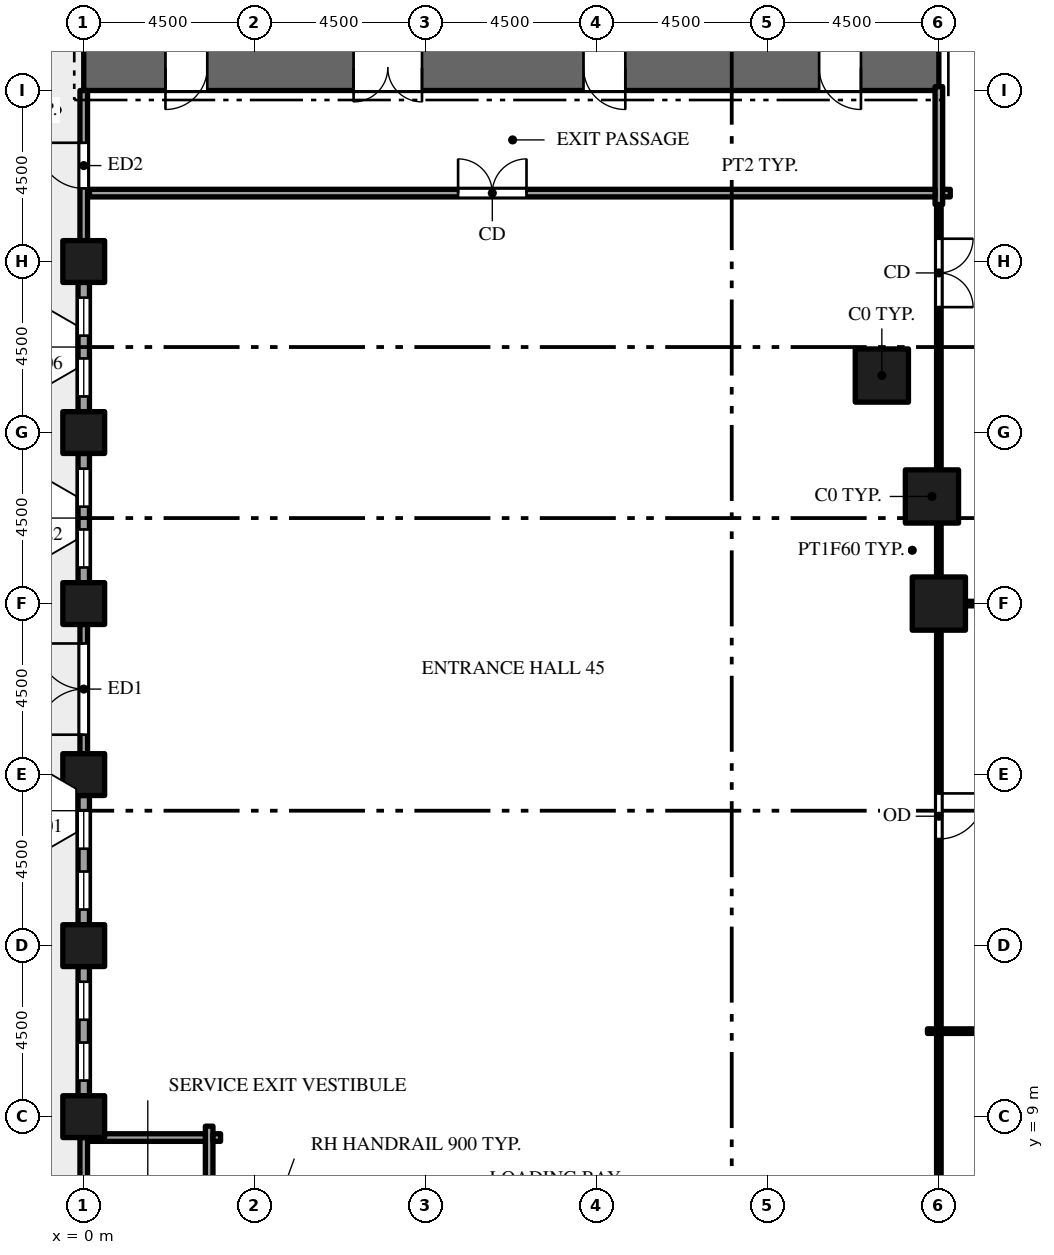
"""IFC4 building model, lengths in metres.
Left out: names, types, materials, properties, quantities, classifications, styles, units other than length and angle.
Written with IfcOpenShell. Run it as: python <this file> out.ifc"""

import sys

from ifc_helpers import new_model, si_unit, direction, frame, frame_2d, origin, origin_2d, place, context, subcontext, project, spatial, rectangle, hollow_rectangle, extrude, element, fill, save


model = new_model("IFC4")
c1 = context("Model", 3, precision=1e-05, world=origin(), true_north=direction((0.0, 1.0)))
c2 = subcontext(c1, "Body", "Model", "MODEL_VIEW")
j1 = project(units=[si_unit("LENGTHUNIT", "METRE"), si_unit("PLANEANGLEUNIT", "RADIAN")], contexts=[c1])
p1 = place(None, origin())
s1 = spatial("IfcSite", under=j1, at=p1, CompositionType="ELEMENT")
p2 = place(p1, origin())
s2 = spatial("IfcBuilding", under=s1, at=p2, CompositionType="ELEMENT")
p3 = place(p2, origin())
s3 = spatial("IfcBuildingStorey", under=s2, at=p3, CompositionType="ELEMENT", Elevation=0.0)
p4 = place(p3, frame((0.0, 36.6, -0.3), z_axis=(0.0, 0.0, 1.0), x_axis=(1.0, 0.0, 0.0)))
e1 = element("IfcWall", 1, at=p4, inside=s3, PredefinedType="SHEAR", context=c2, shape_type="SweptSolid", body=[
    extrude(rectangle(XDim=22.5, YDim=1.2, at=frame_2d((11.25, 0.0))), origin(), (0.0, 0.0, 1.0), 8.15),
])
p5 = place(p4, frame((7.1, 0.0, 0.3)))
e2 = element("IfcOpeningElement", 2, at=p5, cuts=e1, PredefinedType="OPENING", context=c2, shape_type="SweptSolid", body=[
    extrude(rectangle(XDim=1.8, YDim=2.1, at=frame_2d((0.9, 1.05))), frame((0.0, 0.61, 0.0), z_axis=(0.0, -1.0, 0.0), x_axis=(1.0, 0.0, 0.0)), (0.0, 0.0, 1.0), 1.22),
])
p6 = place(p4, frame((13.15, 0.0, 0.3)))
e3 = element("IfcOpeningElement", 3, at=p6, cuts=e1, PredefinedType="OPENING", context=c2, shape_type="SweptSolid", body=[
    extrude(rectangle(XDim=1.1, YDim=2.1, at=frame_2d((0.55, 1.05))), frame((0.0, 0.61, 0.0), z_axis=(0.0, -1.0, 0.0), x_axis=(1.0, 0.0, 0.0)), (0.0, 0.0, 1.0), 1.22),
])
p7 = place(p4, frame((2.15, 0.0, 0.3)))
e4 = element("IfcOpeningElement", 4, at=p7, cuts=e1, PredefinedType="OPENING", context=c2, shape_type="SweptSolid", body=[
    extrude(rectangle(XDim=1.1, YDim=2.1, at=frame_2d((0.55, 1.05))), frame((0.0, 0.61, 0.0), z_axis=(0.0, -1.0, 0.0), x_axis=(1.0, 0.0, 0.0)), (0.0, 0.0, 1.0), 1.22),
])
p8 = place(p4, frame((19.35, 0.0, 0.3)))
e5 = element("IfcOpeningElement", 5, at=p8, cuts=e1, PredefinedType="OPENING", context=c2, shape_type="SweptSolid", body=[
    extrude(rectangle(XDim=1.1, YDim=2.1, at=frame_2d((0.55, 1.05))), frame((0.0, 0.61, 0.0), z_axis=(0.0, -1.0, 0.0), x_axis=(1.0, 0.0, 0.0)), (0.0, 0.0, 1.0), 1.22),
])
for number, where, z_axis, x_axis in (
    (6, (0.0, 9.0, -0.3), (0.0, 0.0, 1.0), (1.0, 0.0, 0.0)),
    (7, (0.0, 13.5, -0.3), (0.0, 0.0, 1.0), (1.0, 0.0, 0.0)),
    (8, (0.0, 18.0, -0.3), (0.0, 0.0, 1.0), (1.0, 0.0, 0.0)),
    (9, (0.0, 22.5, -0.3), (0.0, 0.0, 1.0), (1.0, 0.0, 0.0)),
    (10, (0.0, 27.0, -0.3), (0.0, 0.0, 1.0), (1.0, 0.0, 0.0)),
    (11, (0.0, 31.5, -0.3), (0.0, 0.0, 1.0), (1.0, 0.0, 0.0)),
):
    element("IfcColumn", number, at=place(p3, frame(where, z_axis=z_axis, x_axis=x_axis)), inside=s3, PredefinedType="COLUMN", context=c2, shape_type="SweptSolid", body=[
        extrude(hollow_rectangle(XDim=1.1, YDim=1.1, WallThickness=0.06, at=origin_2d()), origin(), (0.0, 0.0, 1.0), 8.05),
    ])
for number, where, z_axis, x_axis in (
    (12, (21.0, 28.5, -0.3), (0.0, 0.0, 1.0), (1.0, 0.0, 0.0)),
    (13, (22.318, 25.318, -0.3), (0.0, 0.0, 1.0), (1.0, 0.0, 0.0)),
    (14, (22.5, 22.5, -0.3), (0.0, 0.0, 1.0), (1.0, 0.0, 0.0)),
):
    element("IfcColumn", number, at=place(p3, frame(where, z_axis=z_axis, x_axis=x_axis)), inside=s3, PredefinedType="COLUMN", context=c2, shape_type="SweptSolid", body=[
        extrude(hollow_rectangle(XDim=1.4, YDim=1.4, WallThickness=0.08, at=origin_2d()), origin(), (0.0, 0.0, 1.0), 8.05),
    ])
p9 = place(p3, frame((0.0, 32.05, 0.0), z_axis=(0.0, 0.0, 1.0), x_axis=(0.0, 1.0, 0.0)))
e15 = element("IfcWall", 15, at=p9, inside=s3, PredefinedType="STANDARD", context=c2, shape_type="SweptSolid", body=[
    extrude(rectangle(XDim=3.949, YDim=0.2, at=frame_2d((1.975, 0.0))), origin(), (0.0, 0.0, 1.0), 7.036),
])
p10 = place(p9, frame((1.375, 0.0, 0.0)))
e16 = element("IfcOpeningElement", 16, at=p10, cuts=e15, PredefinedType="OPENING", context=c2, shape_type="SweptSolid", body=[
    extrude(rectangle(XDim=1.2, YDim=2.4, at=frame_2d((0.6, 1.2))), frame((0.0, 0.11, 0.0), z_axis=(0.0, -1.0, 0.0), x_axis=(1.0, 0.0, 0.0)), (0.0, 0.0, 1.0), 0.22),
])
p11 = place(p3, frame((0.0, 30.95, 0.0), z_axis=(0.0, 0.0, 1.0), x_axis=(0.0, -1.0, 0.0)))
e17 = element("IfcWall", 17, at=p11, inside=s3, PredefinedType="STANDARD", context=c2, shape_type="SweptSolid", body=[
    extrude(rectangle(XDim=3.4, YDim=0.3, at=frame_2d((1.7, 0.0))), origin(), (0.0, 0.0, 1.0), 7.036),
])
p12 = place(p11, frame((0.4, 0.0, 0.9)))
e18 = element("IfcOpeningElement", 18, at=p12, cuts=e17, PredefinedType="OPENING", context=c2, shape_type="SweptSolid", body=[
    extrude(rectangle(XDim=1.0, YDim=3.5, at=frame_2d((0.5, 1.75))), frame((0.0, 0.16, 0.0), z_axis=(0.0, -1.0, 0.0), x_axis=(1.0, 0.0, 0.0)), (0.0, 0.0, 1.0), 0.32),
])
p13 = place(p11, frame((2.0, 0.0, 0.9)))
e19 = element("IfcOpeningElement", 19, at=p13, cuts=e17, PredefinedType="OPENING", context=c2, shape_type="SweptSolid", body=[
    extrude(rectangle(XDim=1.0, YDim=3.5, at=frame_2d((0.5, 1.75))), frame((0.0, 0.16, 0.0), z_axis=(0.0, -1.0, 0.0), x_axis=(1.0, 0.0, 0.0)), (0.0, 0.0, 1.0), 0.32),
])
p14 = place(p3, frame((0.0, 26.45, 0.0), z_axis=(0.0, 0.0, 1.0), x_axis=(0.0, -1.0, 0.0)))
e20 = element("IfcWall", 20, at=p14, inside=s3, PredefinedType="STANDARD", context=c2, shape_type="SweptSolid", body=[
    extrude(rectangle(XDim=3.4, YDim=0.3, at=frame_2d((1.7, 0.0))), origin(), (0.0, 0.0, 1.0), 7.036),
])
p15 = place(p14, frame((0.4, 0.0, 0.9)))
e21 = element("IfcOpeningElement", 21, at=p15, cuts=e20, PredefinedType="OPENING", context=c2, shape_type="SweptSolid", body=[
    extrude(rectangle(XDim=1.0, YDim=3.5, at=frame_2d((0.5, 1.75))), frame((0.0, 0.16, 0.0), z_axis=(0.0, -1.0, 0.0), x_axis=(1.0, 0.0, 0.0)), (0.0, 0.0, 1.0), 0.32),
])
p16 = place(p14, frame((2.0, 0.0, 0.9)))
e22 = element("IfcOpeningElement", 22, at=p16, cuts=e20, PredefinedType="OPENING", context=c2, shape_type="SweptSolid", body=[
    extrude(rectangle(XDim=1.0, YDim=3.5, at=frame_2d((0.5, 1.75))), frame((0.0, 0.16, 0.0), z_axis=(0.0, -1.0, 0.0), x_axis=(1.0, 0.0, 0.0)), (0.0, 0.0, 1.0), 0.32),
])
p17 = place(p3, frame((0.0, 18.55, 0.0), z_axis=(0.0, 0.0, 1.0), x_axis=(0.0, 1.0, 0.0)))
e23 = element("IfcWall", 23, at=p17, inside=s3, PredefinedType="STANDARD", context=c2, shape_type="SweptSolid", body=[
    extrude(rectangle(XDim=3.4, YDim=0.2, at=frame_2d((1.7, 0.0))), origin(), (0.0, 0.0, 1.0), 7.036),
])
p18 = place(p17, frame((0.5, 0.0, 0.0)))
e24 = element("IfcOpeningElement", 24, at=p18, cuts=e23, PredefinedType="OPENING", context=c2, shape_type="SweptSolid", body=[
    extrude(rectangle(XDim=2.4, YDim=3.0, at=frame_2d((1.2, 1.5))), frame((0.0, 0.11, 0.0), z_axis=(0.0, -1.0, 0.0), x_axis=(1.0, 0.0, 0.0)), (0.0, 0.0, 1.0), 0.22),
])
p19 = place(p3, frame((0.0, 17.45, 0.0), z_axis=(0.0, 0.0, 1.0), x_axis=(0.0, -1.0, 0.0)))
e25 = element("IfcWall", 25, at=p19, inside=s3, PredefinedType="STANDARD", context=c2, shape_type="SweptSolid", body=[
    extrude(rectangle(XDim=3.4, YDim=0.3, at=frame_2d((1.7, 0.0))), origin(), (0.0, 0.0, 1.0), 7.036),
])
p20 = place(p19, frame((0.4, 0.0, 0.9)))
e26 = element("IfcOpeningElement", 26, at=p20, cuts=e25, PredefinedType="OPENING", context=c2, shape_type="SweptSolid", body=[
    extrude(rectangle(XDim=1.0, YDim=3.5, at=frame_2d((0.5, 1.75))), frame((0.0, 0.16, 0.0), z_axis=(0.0, -1.0, 0.0), x_axis=(1.0, 0.0, 0.0)), (0.0, 0.0, 1.0), 0.32),
])
p21 = place(p19, frame((2.0, 0.0, 0.9)))
e27 = element("IfcOpeningElement", 27, at=p21, cuts=e25, PredefinedType="OPENING", context=c2, shape_type="SweptSolid", body=[
    extrude(rectangle(XDim=1.0, YDim=3.5, at=frame_2d((0.5, 1.75))), frame((0.0, 0.16, 0.0), z_axis=(0.0, -1.0, 0.0), x_axis=(1.0, 0.0, 0.0)), (0.0, 0.0, 1.0), 0.32),
])
p22 = place(p3, frame((0.0, 12.95, 0.0), z_axis=(0.0, 0.0, 1.0), x_axis=(0.0, -1.0, 0.0)))
e28 = element("IfcWall", 28, at=p22, inside=s3, PredefinedType="STANDARD", context=c2, shape_type="SweptSolid", body=[
    extrude(rectangle(XDim=3.4, YDim=0.3, at=frame_2d((1.7, 0.0))), origin(), (0.0, 0.0, 1.0), 7.036),
])
p23 = place(p22, frame((0.4, 0.0, 0.9)))
e29 = element("IfcOpeningElement", 29, at=p23, cuts=e28, PredefinedType="OPENING", context=c2, shape_type="SweptSolid", body=[
    extrude(rectangle(XDim=1.0, YDim=3.5, at=frame_2d((0.5, 1.75))), frame((0.0, 0.16, 0.0), z_axis=(0.0, -1.0, 0.0), x_axis=(1.0, 0.0, 0.0)), (0.0, 0.0, 1.0), 0.32),
])
p24 = place(p22, frame((2.0, 0.0, 0.9)))
e30 = element("IfcOpeningElement", 30, at=p24, cuts=e28, PredefinedType="OPENING", context=c2, shape_type="SweptSolid", body=[
    extrude(rectangle(XDim=1.0, YDim=3.5, at=frame_2d((0.5, 1.75))), frame((0.0, 0.16, 0.0), z_axis=(0.0, -1.0, 0.0), x_axis=(1.0, 0.0, 0.0)), (0.0, 0.0, 1.0), 0.32),
])
p25 = place(p3, frame((0.0, 5.05, 0.0), z_axis=(0.0, 0.0, 1.0), x_axis=(0.0, 1.0, 0.0)))
e31 = element("IfcWall", 31, at=p25, inside=s3, PredefinedType="STANDARD", context=c2, shape_type="SweptSolid", body=[
    extrude(rectangle(XDim=3.4, YDim=0.2, at=frame_2d((1.7, 0.0))), origin(), (0.0, 0.0, 1.0), 7.036),
])
p26 = place(p25, frame((1.1, 0.0, 0.0)))
e32 = element("IfcOpeningElement", 32, at=p26, cuts=e31, PredefinedType="OPENING", context=c2, shape_type="SweptSolid", body=[
    extrude(rectangle(XDim=1.2, YDim=2.4, at=frame_2d((0.6, 1.2))), frame((0.0, 0.11, 0.0), z_axis=(0.0, -1.0, 0.0), x_axis=(1.0, 0.0, 0.0)), (0.0, 0.0, 1.0), 0.22),
])
p27 = place(p3, frame((3.3, 3.875, 0.0), z_axis=(0.0, 0.0, 1.0), x_axis=(0.0, 1.0, 0.0)))
e33 = element("IfcWall", 33, at=p27, inside=s3, PredefinedType="PARTITIONING", context=c2, shape_type="SweptSolid", body=[
    extrude(rectangle(XDim=4.875, YDim=0.2, at=frame_2d((2.438, 0.0))), origin(), (0.0, 0.0, 1.0), 7.75),
])
p28 = place(p3, frame((22.5, 0.15, 0.0), z_axis=(0.0, 0.0, 1.0), x_axis=(0.0, 1.0, 0.0)))
e34 = element("IfcWall", 34, at=p28, inside=s3, PredefinedType="PARTITIONING", context=c2, shape_type="SweptSolid", body=[
    extrude(rectangle(XDim=32.85, YDim=0.12, at=frame_2d((16.425, 0.0))), origin(), (0.0, 0.0, 1.0), 6.759),
])
p29 = place(p28, frame((5.35, 0.0, 0.0)))
e35 = element("IfcOpeningElement", 35, at=p29, cuts=e34, PredefinedType="OPENING", context=c2, shape_type="SweptSolid", body=[
    extrude(rectangle(XDim=1.2, YDim=2.1, at=frame_2d((0.6, 1.05))), frame((0.0, 0.07, 0.0), z_axis=(0.0, -1.0, 0.0), x_axis=(1.0, 0.0, 0.0)), (0.0, 0.0, 1.0), 0.14),
])
p30 = place(p28, frame((16.155, 0.0, 0.0)))
e36 = element("IfcOpeningElement", 36, at=p30, cuts=e34, PredefinedType="OPENING", context=c2, shape_type="SweptSolid", body=[
    extrude(rectangle(XDim=1.2, YDim=2.1, at=frame_2d((0.6, 1.05))), frame((0.0, 0.07, 0.0), z_axis=(0.0, -1.0, 0.0), x_axis=(1.0, 0.0, 0.0)), (0.0, 0.0, 1.0), 0.14),
])
p31 = place(p28, frame((30.15, 0.0, 0.0)))
e37 = element("IfcOpeningElement", 37, at=p31, cuts=e34, PredefinedType="OPENING", context=c2, shape_type="SweptSolid", body=[
    extrude(rectangle(XDim=1.8, YDim=2.1, at=frame_2d((0.9, 1.05))), frame((0.0, 0.07, 0.0), z_axis=(0.0, -1.0, 0.0), x_axis=(1.0, 0.0, 0.0)), (0.0, 0.0, 1.0), 0.14),
])
p32 = place(p3, frame((22.5, 33.0, 0.0), z_axis=(0.0, 0.0, 1.0), x_axis=(0.0, 1.0, 0.0)))
e38 = element("IfcWall", 38, at=p32, inside=s3, PredefinedType="PARTITIONING", context=c2, shape_type="SweptSolid", body=[
    extrude(rectangle(XDim=3.1, YDim=0.2, at=frame_2d((1.55, 0.0))), origin(), (0.0, 0.0, 1.0), 6.759),
])
p33 = place(p3, frame((0.15, 8.45, 0.0), z_axis=(0.0, 0.0, 1.0), x_axis=(1.0, 0.0, 0.0)))
e39 = element("IfcWall", 39, at=p33, inside=s3, PredefinedType="PARTITIONING", context=c2, shape_type="SweptSolid", body=[
    extrude(rectangle(XDim=3.05, YDim=0.2, at=frame_2d((1.525, 0.0))), origin(), (0.0, 0.0, 1.0), 6.759),
])
p34 = place(p3, frame((3.4, 8.45, 0.0), z_axis=(0.0, 0.0, 1.0), x_axis=(1.0, 0.0, 0.0)))
e40 = element("IfcWall", 40, at=p34, inside=s3, PredefinedType="PARTITIONING", context=c2, shape_type="SweptSolid", body=[
    extrude(rectangle(XDim=0.2, YDim=0.2, at=frame_2d((0.1, 0.0))), origin(), (0.0, 0.0, 1.0), 7.75),
])
p35 = place(p3, frame((22.2, 11.25, 0.0), z_axis=(0.0, 0.0, 1.0), x_axis=(1.0, 0.0, 0.0)))
e41 = element("IfcWall", 41, at=p35, inside=s3, PredefinedType="PARTITIONING", context=c2, shape_type="SweptSolid", body=[
    extrude(rectangle(XDim=0.24, YDim=0.12, at=frame_2d((0.12, 0.0))), origin(), (0.0, 0.0, 1.0), 6.759),
])
p36 = place(p3, frame((22.56, 11.25, 0.0), z_axis=(0.0, 0.0, 1.0), x_axis=(1.0, 0.0, 0.0)))
e42 = element("IfcWall", 42, at=p36, inside=s3, PredefinedType="PARTITIONING", context=c2, shape_type="SweptSolid", body=[
    extrude(rectangle(XDim=8.88, YDim=0.12, at=frame_2d((4.44, 0.0))), origin(), (0.0, 0.0, 1.0), 6.66),
])
p37 = place(p3, frame((22.2, 22.5, 0.0), z_axis=(0.0, 0.0, 1.0), x_axis=(1.0, 0.0, 0.0)))
e43 = element("IfcWall", 43, at=p37, inside=s3, PredefinedType="PARTITIONING", context=c2, shape_type="SweptSolid", body=[
    extrude(rectangle(XDim=0.24, YDim=0.12, at=frame_2d((0.12, 0.0))), origin(), (0.0, 0.0, 1.0), 7.75),
])
p38 = place(p3, frame((22.56, 22.5, 0.0), z_axis=(0.0, 0.0, 1.0), x_axis=(1.0, 0.0, 0.0)))
e44 = element("IfcWall", 44, at=p38, inside=s3, PredefinedType="PARTITIONING", context=c2, shape_type="SweptSolid", body=[
    extrude(rectangle(XDim=4.38, YDim=0.12, at=frame_2d((2.19, 0.0))), origin(), (0.0, 0.0, 1.0), 6.66),
])
p39 = place(p3, frame((0.15, 33.3, 0.0), z_axis=(0.0, 0.0, 1.0), x_axis=(1.0, 0.0, 0.0)))
e45 = element("IfcWall", 45, at=p39, inside=s3, PredefinedType="PARTITIONING", context=c2, shape_type="SweptSolid", body=[
    extrude(rectangle(XDim=22.25, YDim=0.2, at=frame_2d((11.125, 0.0))), origin(), (0.0, 0.0, 1.0), 6.5),
])
p40 = place(p39, frame((9.7, 0.0, 0.0)))
e46 = element("IfcOpeningElement", 46, at=p40, cuts=e45, PredefinedType="OPENING", context=c2, shape_type="SweptSolid", body=[
    extrude(rectangle(XDim=1.8, YDim=2.1, at=frame_2d((0.9, 1.05))), frame((0.0, 0.11, 0.0), z_axis=(0.0, -1.0, 0.0), x_axis=(1.0, 0.0, 0.0)), (0.0, 0.0, 1.0), 0.22),
])
p41 = place(p3, frame((22.6, 33.3, 0.0), z_axis=(0.0, 0.0, 1.0), x_axis=(1.0, 0.0, 0.0)))
e47 = element("IfcWall", 47, at=p41, inside=s3, PredefinedType="PARTITIONING", context=c2, shape_type="SweptSolid", body=[
    extrude(rectangle(XDim=0.2, YDim=0.2, at=frame_2d((0.1, 0.0))), origin(), (0.0, 0.0, 1.0), 6.759),
])
p42 = place(p10, origin())
e48 = element("IfcDoor", 48, at=p42, inside=s3, OperationType="SINGLE_SWING_RIGHT", PredefinedType="DOOR", context=c2, shape_type="SweptSolid", body=[
    extrude(rectangle(XDim=1.2, YDim=2.4, at=frame_2d((0.6, 1.2))), frame((0.0, 0.025, 0.0), z_axis=(0.0, -1.0, 0.0), x_axis=(1.0, 0.0, 0.0)), (0.0, 0.0, 1.0), 0.05),
])
fill(e16, e48)
p43 = place(p12, origin())
e49 = element("IfcWindow", 49, at=p43, inside=s3, PartitioningType="SINGLE_PANEL", PredefinedType="WINDOW", context=c2, shape_type="SweptSolid", body=[
    extrude(rectangle(XDim=1.0, YDim=3.5, at=frame_2d((0.5, 1.75))), frame((0.0, 0.03, 0.0), z_axis=(0.0, -1.0, 0.0), x_axis=(1.0, 0.0, 0.0)), (0.0, 0.0, 1.0), 0.06),
])
fill(e18, e49)
p44 = place(p13, origin())
e50 = element("IfcWindow", 50, at=p44, inside=s3, PartitioningType="SINGLE_PANEL", PredefinedType="WINDOW", context=c2, shape_type="SweptSolid", body=[
    extrude(rectangle(XDim=1.0, YDim=3.5, at=frame_2d((0.5, 1.75))), frame((0.0, 0.03, 0.0), z_axis=(0.0, -1.0, 0.0), x_axis=(1.0, 0.0, 0.0)), (0.0, 0.0, 1.0), 0.06),
])
fill(e19, e50)
p45 = place(p15, origin())
e51 = element("IfcWindow", 51, at=p45, inside=s3, PartitioningType="SINGLE_PANEL", PredefinedType="WINDOW", context=c2, shape_type="SweptSolid", body=[
    extrude(rectangle(XDim=1.0, YDim=3.5, at=frame_2d((0.5, 1.75))), frame((0.0, 0.03, 0.0), z_axis=(0.0, -1.0, 0.0), x_axis=(1.0, 0.0, 0.0)), (0.0, 0.0, 1.0), 0.06),
])
fill(e21, e51)
p46 = place(p16, origin())
e52 = element("IfcWindow", 52, at=p46, inside=s3, PartitioningType="SINGLE_PANEL", PredefinedType="WINDOW", context=c2, shape_type="SweptSolid", body=[
    extrude(rectangle(XDim=1.0, YDim=3.5, at=frame_2d((0.5, 1.75))), frame((0.0, 0.03, 0.0), z_axis=(0.0, -1.0, 0.0), x_axis=(1.0, 0.0, 0.0)), (0.0, 0.0, 1.0), 0.06),
])
fill(e22, e52)
p47 = place(p18, origin())
e53 = element("IfcDoor", 53, at=p47, inside=s3, OperationType="DOUBLE_DOOR_SINGLE_SWING", PredefinedType="DOOR", context=c2, shape_type="SweptSolid", body=[
    extrude(rectangle(XDim=2.4, YDim=3.0, at=frame_2d((1.2, 1.5))), frame((0.0, 0.025, 0.0), z_axis=(0.0, -1.0, 0.0), x_axis=(1.0, 0.0, 0.0)), (0.0, 0.0, 1.0), 0.05),
])
fill(e24, e53)
p48 = place(p20, origin())
e54 = element("IfcWindow", 54, at=p48, inside=s3, PartitioningType="SINGLE_PANEL", PredefinedType="WINDOW", context=c2, shape_type="SweptSolid", body=[
    extrude(rectangle(XDim=1.0, YDim=3.5, at=frame_2d((0.5, 1.75))), frame((0.0, 0.03, 0.0), z_axis=(0.0, -1.0, 0.0), x_axis=(1.0, 0.0, 0.0)), (0.0, 0.0, 1.0), 0.06),
])
fill(e26, e54)
p49 = place(p21, origin())
e55 = element("IfcWindow", 55, at=p49, inside=s3, PartitioningType="SINGLE_PANEL", PredefinedType="WINDOW", context=c2, shape_type="SweptSolid", body=[
    extrude(rectangle(XDim=1.0, YDim=3.5, at=frame_2d((0.5, 1.75))), frame((0.0, 0.03, 0.0), z_axis=(0.0, -1.0, 0.0), x_axis=(1.0, 0.0, 0.0)), (0.0, 0.0, 1.0), 0.06),
])
fill(e27, e55)
p50 = place(p23, origin())
e56 = element("IfcWindow", 56, at=p50, inside=s3, PartitioningType="SINGLE_PANEL", PredefinedType="WINDOW", context=c2, shape_type="SweptSolid", body=[
    extrude(rectangle(XDim=1.0, YDim=3.5, at=frame_2d((0.5, 1.75))), frame((0.0, 0.03, 0.0), z_axis=(0.0, -1.0, 0.0), x_axis=(1.0, 0.0, 0.0)), (0.0, 0.0, 1.0), 0.06),
])
fill(e29, e56)
p51 = place(p24, origin())
e57 = element("IfcWindow", 57, at=p51, inside=s3, PartitioningType="SINGLE_PANEL", PredefinedType="WINDOW", context=c2, shape_type="SweptSolid", body=[
    extrude(rectangle(XDim=1.0, YDim=3.5, at=frame_2d((0.5, 1.75))), frame((0.0, 0.03, 0.0), z_axis=(0.0, -1.0, 0.0), x_axis=(1.0, 0.0, 0.0)), (0.0, 0.0, 1.0), 0.06),
])
fill(e30, e57)
p52 = place(p5, origin())
e58 = element("IfcDoor", 58, at=p52, inside=s3, OperationType="DOUBLE_DOOR_SINGLE_SWING", PredefinedType="DOOR", context=c2, shape_type="SweptSolid", body=[
    extrude(rectangle(XDim=1.8, YDim=2.1, at=frame_2d((0.9, 1.05))), frame((0.0, 0.025, 0.0), z_axis=(0.0, -1.0, 0.0), x_axis=(1.0, 0.0, 0.0)), (0.0, 0.0, 1.0), 0.05),
])
fill(e2, e58)
p53 = place(p6, origin())
e59 = element("IfcDoor", 59, at=p53, inside=s3, OperationType="SINGLE_SWING_RIGHT", PredefinedType="DOOR", context=c2, shape_type="SweptSolid", body=[
    extrude(rectangle(XDim=1.1, YDim=2.1, at=frame_2d((0.55, 1.05))), frame((0.0, 0.025, 0.0), z_axis=(0.0, -1.0, 0.0), x_axis=(1.0, 0.0, 0.0)), (0.0, 0.0, 1.0), 0.05),
])
fill(e3, e59)
p54 = place(p7, origin())
e60 = element("IfcDoor", 60, at=p54, inside=s3, OperationType="SINGLE_SWING_LEFT", PredefinedType="DOOR", context=c2, shape_type="SweptSolid", body=[
    extrude(rectangle(XDim=1.1, YDim=2.1, at=frame_2d((0.55, 1.05))), frame((0.0, 0.025, 0.0), z_axis=(0.0, -1.0, 0.0), x_axis=(1.0, 0.0, 0.0)), (0.0, 0.0, 1.0), 0.05),
])
fill(e4, e60)
p55 = place(p8, origin())
e61 = element("IfcDoor", 61, at=p55, inside=s3, OperationType="SINGLE_SWING_RIGHT", PredefinedType="DOOR", context=c2, shape_type="SweptSolid", body=[
    extrude(rectangle(XDim=1.1, YDim=2.1, at=frame_2d((0.55, 1.05))), frame((0.0, 0.025, 0.0), z_axis=(0.0, -1.0, 0.0), x_axis=(1.0, 0.0, 0.0)), (0.0, 0.0, 1.0), 0.05),
])
fill(e5, e61)
p56 = place(p40, origin())
e62 = element("IfcDoor", 62, at=p56, inside=s3, OperationType="DOUBLE_DOOR_SINGLE_SWING", PredefinedType="DOOR", context=c2, shape_type="SweptSolid", body=[
    extrude(rectangle(XDim=1.8, YDim=2.1, at=frame_2d((0.9, 1.05))), frame((0.0, 0.025, 0.0), z_axis=(0.0, -1.0, 0.0), x_axis=(1.0, 0.0, 0.0)), (0.0, 0.0, 1.0), 0.05),
])
fill(e46, e62)
p57 = place(p30, origin())
e63 = element("IfcDoor", 63, at=p57, inside=s3, OperationType="SINGLE_SWING_RIGHT", PredefinedType="DOOR", context=c2, shape_type="SweptSolid", body=[
    extrude(rectangle(XDim=1.2, YDim=2.1, at=frame_2d((0.6, 1.05))), frame((0.0, 0.025, 0.0), z_axis=(0.0, -1.0, 0.0), x_axis=(1.0, 0.0, 0.0)), (0.0, 0.0, 1.0), 0.05),
])
fill(e36, e63)
p58 = place(p31, origin())
e64 = element("IfcDoor", 64, at=p58, inside=s3, OperationType="DOUBLE_DOOR_SINGLE_SWING", PredefinedType="DOOR", context=c2, shape_type="SweptSolid", body=[
    extrude(rectangle(XDim=1.8, YDim=2.1, at=frame_2d((0.9, 1.05))), frame((0.0, 0.025, 0.0), z_axis=(0.0, -1.0, 0.0), x_axis=(1.0, 0.0, 0.0)), (0.0, 0.0, 1.0), 0.05),
])
fill(e37, e64)
save(model, sys.argv[1])
